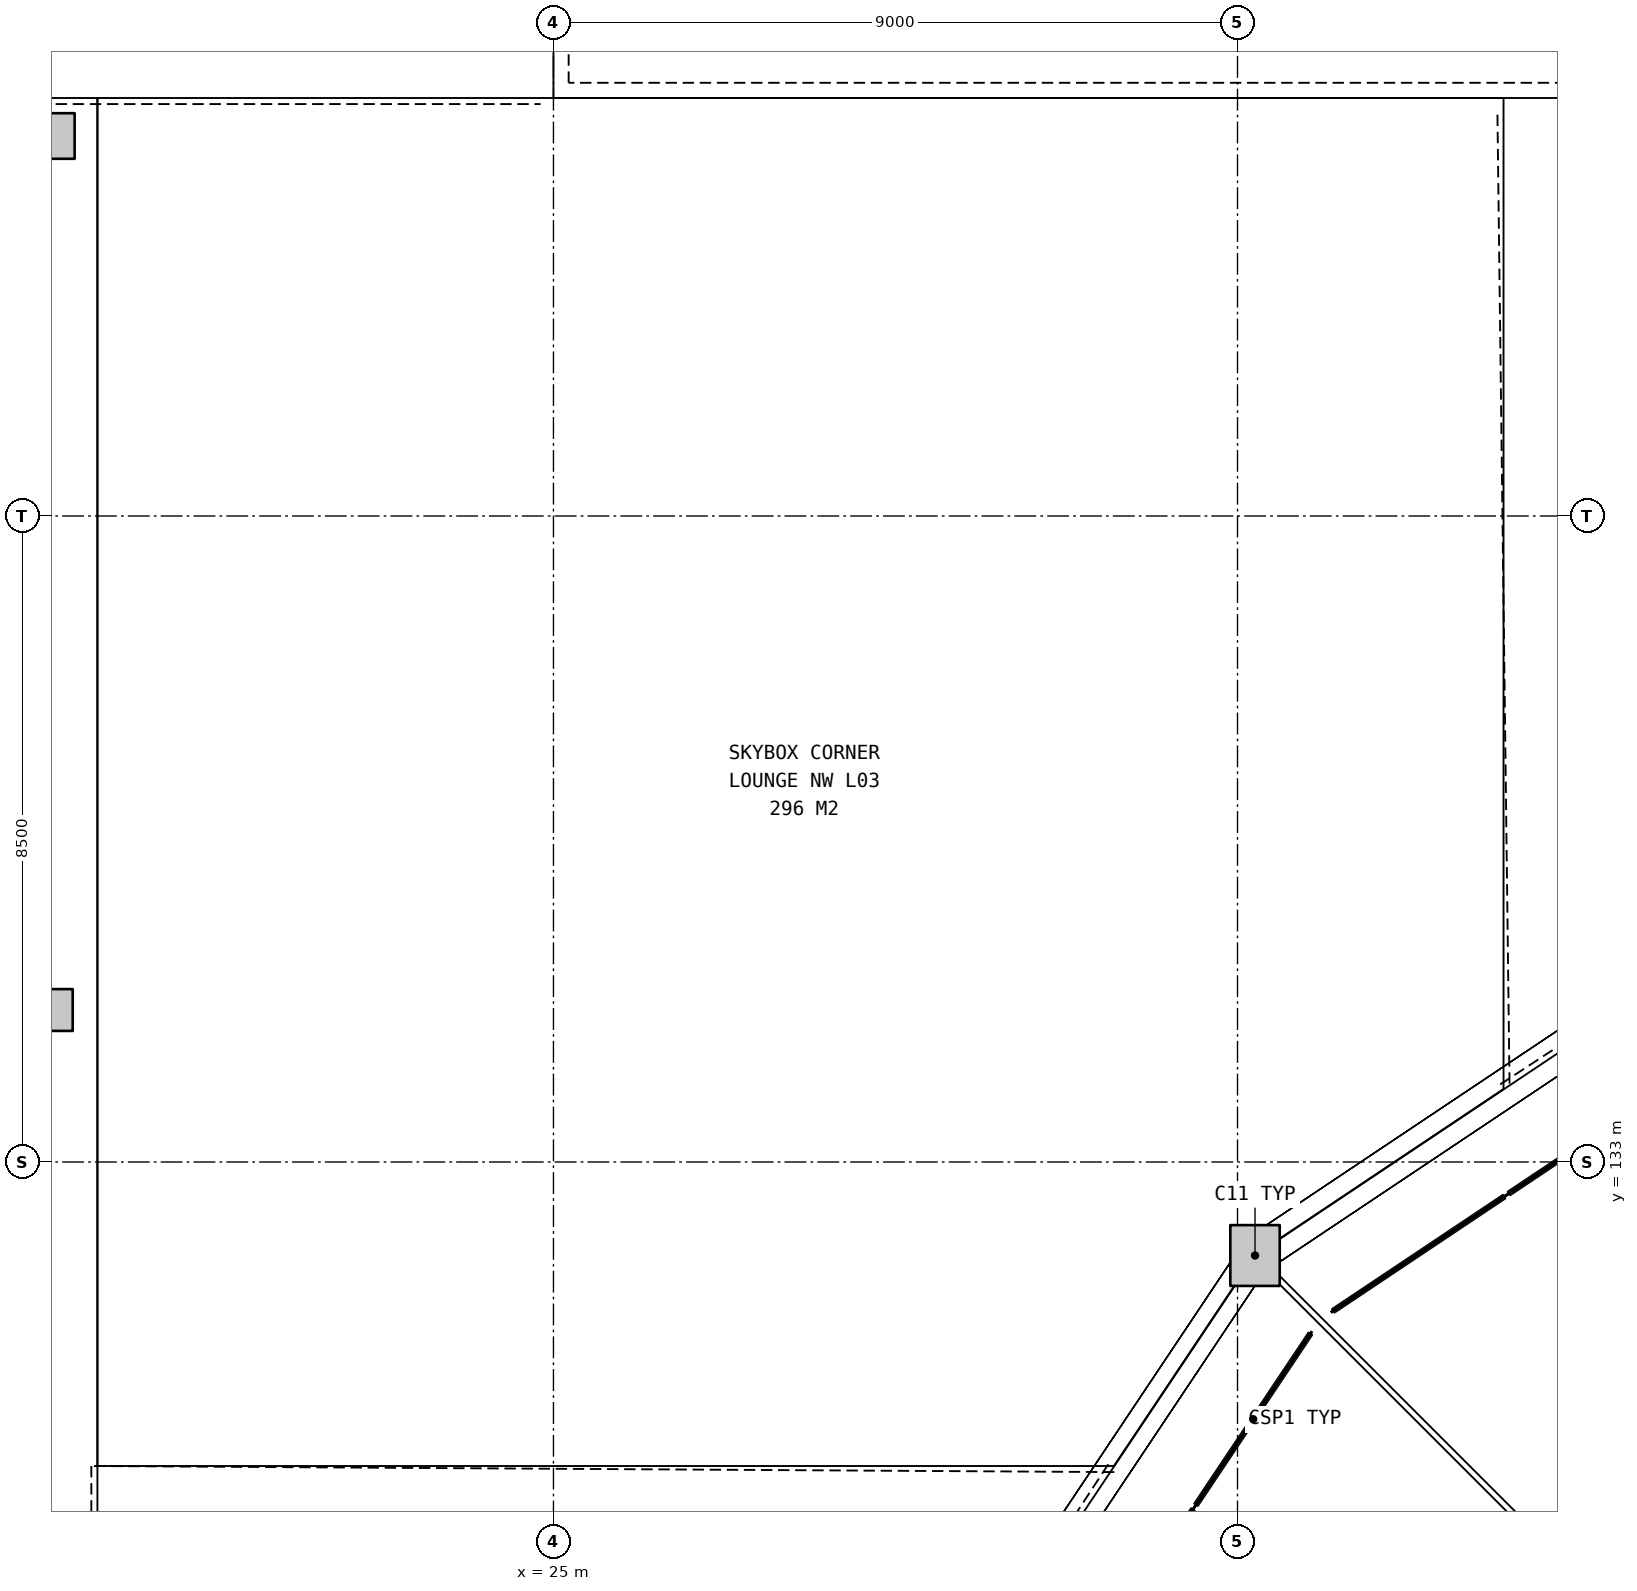
"""IFC4 building model, lengths in metres.
Left out: names, types, materials, properties, quantities, classifications, styles, units other than length and angle.
Written with IfcOpenShell. Run it as: python <this file> out.ifc"""

import sys

from ifc_helpers import new_model, si_unit, direction, frame, origin, origin_2d, place, context, subcontext, project, spatial, rectangle, extrude, element, save


model = new_model("IFC4")
c1 = context("Model", 3, precision=1e-05, world=origin(), true_north=direction((0.0, 1.0)))
c2 = subcontext(c1, "Body", "Model", "MODEL_VIEW")
j1 = project(units=[si_unit("LENGTHUNIT", "METRE"), si_unit("PLANEANGLEUNIT", "RADIAN")], contexts=[c1])
p1 = place(None, origin())
s1 = spatial("IfcSite", under=j1, at=p1, CompositionType="ELEMENT")
p2 = place(p1, origin())
s2 = spatial("IfcBuilding", under=s1, at=p2, CompositionType="ELEMENT")
p3 = place(p2, frame((0.0, 0.0, 16.2)))
s3 = spatial("IfcBuildingStorey", under=s2, at=p3, CompositionType="ELEMENT", Elevation=16.2)
p4 = place(p3, frame((34.23, 131.77, 0.0), z_axis=(0.0, 0.0, 1.0), x_axis=(1.0, 0.0, 0.0)))
e1 = element("IfcColumn", 1, at=p4, inside=s3, PredefinedType="COLUMN", context=c2, shape_type="SweptSolid", body=[
    extrude(rectangle(XDim=0.65, YDim=0.8, at=origin_2d()), origin(), (0.0, 0.0, 1.0), 5.4),
])
p5 = place(p3, frame((18.4, 135.0, 0.0), z_axis=(0.0, 0.0, 1.0), x_axis=(1.0, 0.0, 0.0)))
e2 = element("IfcColumn", 2, at=p5, inside=s3, PredefinedType="COLUMN", context=c2, shape_type="SweptSolid", body=[
    extrude(rectangle(XDim=0.55, YDim=0.55, at=origin_2d()), origin(), (0.0, 0.0, 1.0), 5.4),
])
p6 = place(p3, frame((18.4, 146.5, 0.0), z_axis=(0.0, 0.0, 1.0), x_axis=(1.0, 0.0, 0.0)))
e3 = element("IfcColumn", 3, at=p6, inside=s3, PredefinedType="COLUMN", context=c2, shape_type="SweptSolid", body=[
    extrude(rectangle(XDim=0.6, YDim=0.6, at=origin_2d()), origin(), (0.0, 0.0, 1.0), 5.4),
])
save(model, sys.argv[1])
